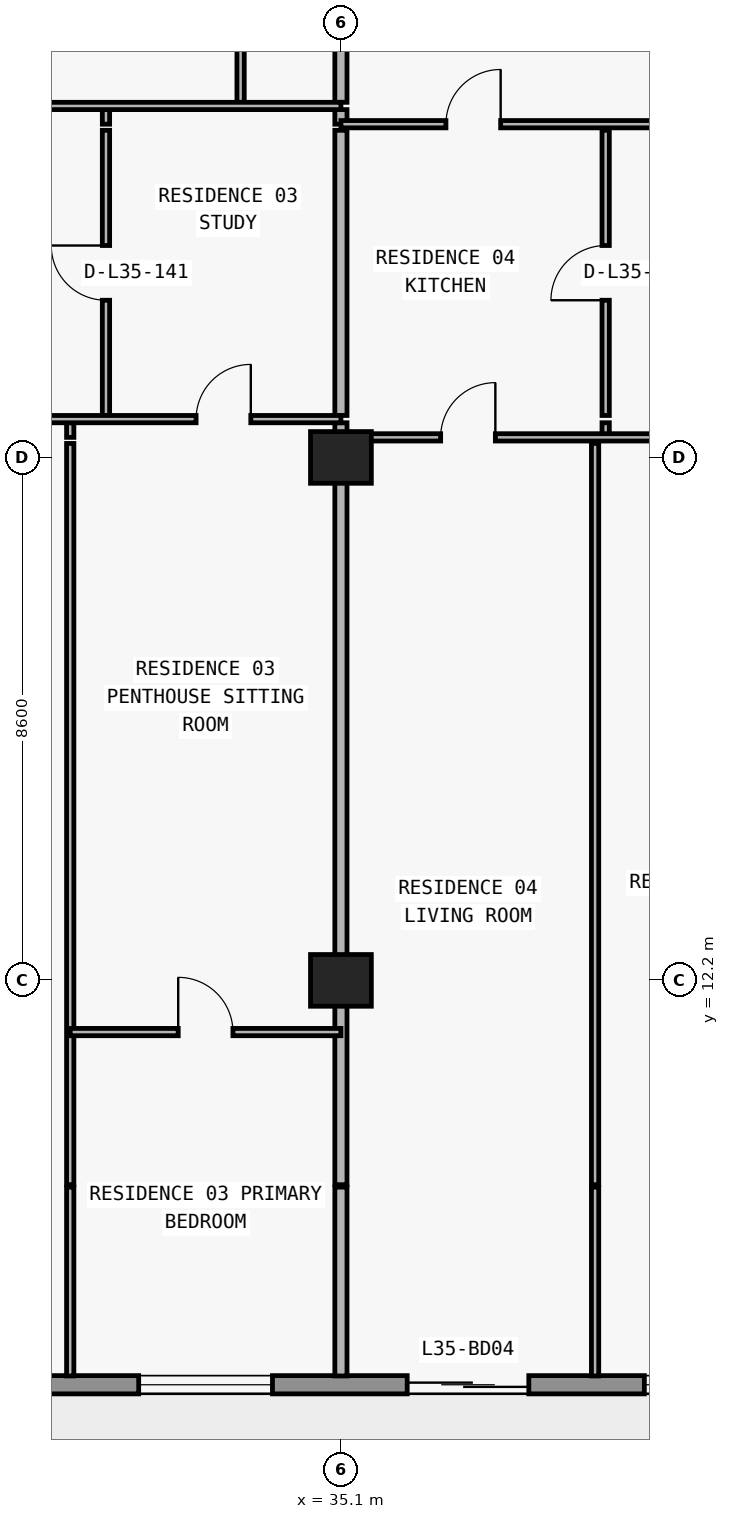
"""IFC4 building model, lengths in metres.
Left out: names, types, materials, properties, quantities, classifications, styles, units other than length and angle.
Written with IfcOpenShell. Run it as: python <this file> out.ifc"""

import sys

from ifc_helpers import new_model, si_unit, direction, frame, frame_2d, origin, origin_2d, place, context, subcontext, project, spatial, rectangle, extrude, element, fill, save


model = new_model("IFC4")
c1 = context("Model", 3, precision=1e-05, world=origin(), true_north=direction((0.0, 1.0)))
c2 = subcontext(c1, "Body", "Model", "MODEL_VIEW")
j1 = project(units=[si_unit("LENGTHUNIT", "METRE"), si_unit("PLANEANGLEUNIT", "RADIAN")], contexts=[c1])
p1 = place(None, origin())
s1 = spatial("IfcSite", under=j1, at=p1, CompositionType="ELEMENT")
p2 = place(p1, origin())
s2 = spatial("IfcBuilding", under=s1, at=p2, CompositionType="ELEMENT")
p3 = place(p2, frame((0.0, 0.0, 129.0)))
s3 = spatial("IfcBuildingStorey", under=s2, at=p3, CompositionType="ELEMENT", Elevation=129.0)
for number, where, z_axis, x_axis in (
    (1, (35.1, 12.2, 0.0), (0.0, 0.0, 1.0), (1.0, 0.0, 0.0)),
    (2, (35.1, 20.8, 0.0), (0.0, 0.0, 1.0), (1.0, 0.0, 0.0)),
):
    element("IfcColumn", number, at=place(p3, frame(where, z_axis=z_axis, x_axis=x_axis)), inside=s3, PredefinedType="COLUMN", context=c2, shape_type="SweptSolid", body=[
        extrude(rectangle(XDim=1.0, YDim=0.85, at=origin_2d()), origin(), (0.0, 0.0, 1.0), 3.05),
    ])
p4 = place(p3, frame((70.1, 5.55, 0.0), z_axis=(0.0, 0.0, 1.0), x_axis=(-1.0, 0.0, 0.0)))
e3 = element("IfcWall", 3, at=p4, inside=s3, PredefinedType="STANDARD", context=c2, shape_type="SweptSolid", body=[
    extrude(rectangle(XDim=62.4, YDim=0.3, at=frame_2d((31.2, 0.0))), origin(), (0.0, 0.0, 1.0), 3.05),
])
p5 = place(p4, frame((57.226, 0.0, 0.0)))
e4 = element("IfcOpeningElement", 4, at=p5, cuts=e3, PredefinedType="OPENING", context=c2, shape_type="SweptSolid", body=[
    extrude(rectangle(XDim=2.0, YDim=2.3, at=frame_2d((1.0, 1.15))), frame((0.0, 0.16, 0.0), z_axis=(0.0, -1.0, 0.0), x_axis=(1.0, 0.0, 0.0)), (0.0, 0.0, 1.0), 0.32),
])
p6 = place(p4, frame((52.926, 0.0, 0.85)))
e5 = element("IfcOpeningElement", 5, at=p6, cuts=e3, PredefinedType="OPENING", context=c2, shape_type="SweptSolid", body=[
    extrude(rectangle(XDim=2.2, YDim=1.55, at=frame_2d((1.1, 0.775))), frame((0.0, 0.16, 0.0), z_axis=(0.0, -1.0, 0.0), x_axis=(1.0, 0.0, 0.0)), (0.0, 0.0, 1.0), 0.32),
])
p7 = place(p4, frame((48.49, 0.0, 0.0)))
e6 = element("IfcOpeningElement", 6, at=p7, cuts=e3, PredefinedType="OPENING", context=c2, shape_type="SweptSolid", body=[
    extrude(rectangle(XDim=2.0, YDim=2.3, at=frame_2d((1.0, 1.15))), frame((0.0, 0.16, 0.0), z_axis=(0.0, -1.0, 0.0), x_axis=(1.0, 0.0, 0.0)), (0.0, 0.0, 1.0), 0.32),
])
p8 = place(p4, frame((44.39, 0.0, 0.85)))
e7 = element("IfcOpeningElement", 7, at=p8, cuts=e3, PredefinedType="OPENING", context=c2, shape_type="SweptSolid", body=[
    extrude(rectangle(XDim=1.8, YDim=1.55, at=frame_2d((0.9, 0.775))), frame((0.0, 0.16, 0.0), z_axis=(0.0, -1.0, 0.0), x_axis=(1.0, 0.0, 0.0)), (0.0, 0.0, 1.0), 0.32),
])
p9 = place(p4, frame((40.426, 0.0, 0.0)))
e8 = element("IfcOpeningElement", 8, at=p9, cuts=e3, PredefinedType="OPENING", context=c2, shape_type="SweptSolid", body=[
    extrude(rectangle(XDim=2.0, YDim=2.3, at=frame_2d((1.0, 1.15))), frame((0.0, 0.16, 0.0), z_axis=(0.0, -1.0, 0.0), x_axis=(1.0, 0.0, 0.0)), (0.0, 0.0, 1.0), 0.32),
])
p10 = place(p4, frame((36.126, 0.0, 0.85)))
e9 = element("IfcOpeningElement", 9, at=p10, cuts=e3, PredefinedType="OPENING", context=c2, shape_type="SweptSolid", body=[
    extrude(rectangle(XDim=2.2, YDim=1.55, at=frame_2d((1.1, 0.775))), frame((0.0, 0.16, 0.0), z_axis=(0.0, -1.0, 0.0), x_axis=(1.0, 0.0, 0.0)), (0.0, 0.0, 1.0), 0.32),
])
p11 = place(p4, frame((31.91, 0.0, 0.0)))
e10 = element("IfcOpeningElement", 10, at=p11, cuts=e3, PredefinedType="OPENING", context=c2, shape_type="SweptSolid", body=[
    extrude(rectangle(XDim=2.0, YDim=2.3, at=frame_2d((1.0, 1.15))), frame((0.0, 0.16, 0.0), z_axis=(0.0, -1.0, 0.0), x_axis=(1.0, 0.0, 0.0)), (0.0, 0.0, 1.0), 0.32),
])
p12 = place(p4, frame((28.21, 0.0, 0.85)))
e11 = element("IfcOpeningElement", 11, at=p12, cuts=e3, PredefinedType="OPENING", context=c2, shape_type="SweptSolid", body=[
    extrude(rectangle(XDim=1.8, YDim=1.55, at=frame_2d((0.9, 0.775))), frame((0.0, 0.16, 0.0), z_axis=(0.0, -1.0, 0.0), x_axis=(1.0, 0.0, 0.0)), (0.0, 0.0, 1.0), 0.32),
])
p13 = place(p4, frame((24.426, 0.0, 0.0)))
e12 = element("IfcOpeningElement", 12, at=p13, cuts=e3, PredefinedType="OPENING", context=c2, shape_type="SweptSolid", body=[
    extrude(rectangle(XDim=2.0, YDim=2.3, at=frame_2d((1.0, 1.15))), frame((0.0, 0.16, 0.0), z_axis=(0.0, -1.0, 0.0), x_axis=(1.0, 0.0, 0.0)), (0.0, 0.0, 1.0), 0.32),
])
p14 = place(p4, frame((20.126, 0.0, 0.85)))
e13 = element("IfcOpeningElement", 13, at=p14, cuts=e3, PredefinedType="OPENING", context=c2, shape_type="SweptSolid", body=[
    extrude(rectangle(XDim=2.2, YDim=1.55, at=frame_2d((1.1, 0.775))), frame((0.0, 0.16, 0.0), z_axis=(0.0, -1.0, 0.0), x_axis=(1.0, 0.0, 0.0)), (0.0, 0.0, 1.0), 0.32),
])
p15 = place(p4, frame((15.69, 0.0, 0.0)))
e14 = element("IfcOpeningElement", 14, at=p15, cuts=e3, PredefinedType="OPENING", context=c2, shape_type="SweptSolid", body=[
    extrude(rectangle(XDim=2.0, YDim=2.3, at=frame_2d((1.0, 1.15))), frame((0.0, 0.16, 0.0), z_axis=(0.0, -1.0, 0.0), x_axis=(1.0, 0.0, 0.0)), (0.0, 0.0, 1.0), 0.32),
])
p16 = place(p4, frame((11.59, 0.0, 0.85)))
e15 = element("IfcOpeningElement", 15, at=p16, cuts=e3, PredefinedType="OPENING", context=c2, shape_type="SweptSolid", body=[
    extrude(rectangle(XDim=1.8, YDim=1.55, at=frame_2d((0.9, 0.775))), frame((0.0, 0.16, 0.0), z_axis=(0.0, -1.0, 0.0), x_axis=(1.0, 0.0, 0.0)), (0.0, 0.0, 1.0), 0.32),
])
p17 = place(p4, frame((7.626, 0.0, 0.0)))
e16 = element("IfcOpeningElement", 16, at=p17, cuts=e3, PredefinedType="OPENING", context=c2, shape_type="SweptSolid", body=[
    extrude(rectangle(XDim=2.0, YDim=2.3, at=frame_2d((1.0, 1.15))), frame((0.0, 0.16, 0.0), z_axis=(0.0, -1.0, 0.0), x_axis=(1.0, 0.0, 0.0)), (0.0, 0.0, 1.0), 0.32),
])
p18 = place(p4, frame((3.326, 0.0, 0.85)))
e17 = element("IfcOpeningElement", 17, at=p18, cuts=e3, PredefinedType="OPENING", context=c2, shape_type="SweptSolid", body=[
    extrude(rectangle(XDim=2.2, YDim=1.55, at=frame_2d((1.1, 0.775))), frame((0.0, 0.16, 0.0), z_axis=(0.0, -1.0, 0.0), x_axis=(1.0, 0.0, 0.0)), (0.0, 0.0, 1.0), 0.32),
])
p19 = place(p3, frame((30.648, 5.695, 0.0), z_axis=(0.0, 0.0, 1.0), x_axis=(0.0, 1.0, 0.0)))
e18 = element("IfcWall", 18, at=p19, inside=s3, PredefinedType="PARTITIONING", context=c2, shape_type="SweptSolid", body=[
    extrude(rectangle(XDim=3.105, YDim=0.12, at=frame_2d((1.552, 0.0))), origin(), (0.0, 0.0, 1.0), 3.05),
])
p20 = place(p3, frame((30.648, 8.84, 0.0), z_axis=(0.0, 0.0, 1.0), x_axis=(0.0, 1.0, 0.0)))
e19 = element("IfcWall", 19, at=p20, inside=s3, PredefinedType="PARTITIONING", context=c2, shape_type="SweptSolid", body=[
    extrude(rectangle(XDim=12.19, YDim=0.12, at=frame_2d((6.095, 0.0))), origin(), (0.0, 0.0, 1.0), 3.05),
])
p21 = place(p3, frame((30.648, 21.13, 0.0), z_axis=(0.0, 0.0, 1.0), x_axis=(0.0, 1.0, 0.0)))
e20 = element("IfcWall", 20, at=p21, inside=s3, PredefinedType="PARTITIONING", context=c2, shape_type="SweptSolid", body=[
    extrude(rectangle(XDim=0.24, YDim=0.12, at=frame_2d((0.12, 0.0))), origin(), (0.0, 0.0, 1.0), 3.05),
])
p22 = place(p3, frame((31.236, 21.49, 0.0), z_axis=(0.0, 0.0, 1.0), x_axis=(0.0, 1.0, 0.0)))
e21 = element("IfcWall", 21, at=p22, inside=s3, PredefinedType="PARTITIONING", context=c2, shape_type="SweptSolid", body=[
    extrude(rectangle(XDim=4.69, YDim=0.12, at=frame_2d((2.345, 0.0))), origin(), (0.0, 0.0, 1.0), 3.05),
])
p23 = place(p22, frame((1.895, 0.0, 0.0)))
e22 = element("IfcOpeningElement", 22, at=p23, cuts=e21, PredefinedType="OPENING", context=c2, shape_type="SweptSolid", body=[
    extrude(rectangle(XDim=0.9, YDim=2.15, at=frame_2d((0.45, 1.075))), frame((0.0, 0.07, 0.0), z_axis=(0.0, -1.0, 0.0), x_axis=(1.0, 0.0, 0.0)), (0.0, 0.0, 1.0), 0.14),
])
p24 = place(p3, frame((31.236, 26.28, 0.0), z_axis=(0.0, 0.0, 1.0), x_axis=(0.0, 1.0, 0.0)))
e23 = element("IfcWall", 23, at=p24, inside=s3, PredefinedType="PARTITIONING", context=c2, shape_type="SweptSolid", body=[
    extrude(rectangle(XDim=0.24, YDim=0.12, at=frame_2d((0.12, 0.0))), origin(), (0.0, 0.0, 1.0), 3.05),
])
p25 = place(p3, frame((33.45, 26.64, 0.0), z_axis=(0.0, 0.0, 1.0), x_axis=(0.0, 1.0, 0.0)))
e24 = element("IfcWall", 24, at=p25, inside=s3, PredefinedType="PARTITIONING", context=c2, shape_type="SweptSolid", body=[
    extrude(rectangle(XDim=8.06, YDim=0.12, at=frame_2d((4.03, 0.0))), origin(), (0.0, 0.0, 1.0), 3.05),
])
p26 = place(p25, frame((3.755, 0.0, 0.0)))
e25 = element("IfcOpeningElement", 25, at=p26, cuts=e24, PredefinedType="OPENING", context=c2, shape_type="SweptSolid", body=[
    extrude(rectangle(XDim=0.85, YDim=2.1, at=frame_2d((0.425, 1.05))), frame((0.0, 0.07, 0.0), z_axis=(0.0, -1.0, 0.0), x_axis=(1.0, 0.0, 0.0)), (0.0, 0.0, 1.0), 0.14),
])
p27 = place(p3, frame((35.1, 5.695, 0.0), z_axis=(0.0, 0.0, 1.0), x_axis=(0.0, 1.0, 0.0)))
e26 = element("IfcWall", 26, at=p27, inside=s3, PredefinedType="PARTITIONING", context=c2, shape_type="SweptSolid", body=[
    extrude(rectangle(XDim=3.105, YDim=0.2, at=frame_2d((1.552, 0.0))), origin(), (0.0, 0.0, 1.0), 3.05),
])
p28 = place(p3, frame((35.1, 8.84, 0.0), z_axis=(0.0, 0.0, 1.0), x_axis=(0.0, 1.0, 0.0)))
e27 = element("IfcWall", 27, at=p28, inside=s3, PredefinedType="PARTITIONING", context=c2, shape_type="SweptSolid", body=[
    extrude(rectangle(XDim=12.19, YDim=0.2, at=frame_2d((6.095, 0.0))), origin(), (0.0, 0.0, 1.0), 2.174),
])
p29 = place(p3, frame((35.1, 21.13, 0.0), z_axis=(0.0, 0.0, 1.0), x_axis=(0.0, 1.0, 0.0)))
e28 = element("IfcWall", 28, at=p29, inside=s3, PredefinedType="PARTITIONING", context=c2, shape_type="SweptSolid", body=[
    extrude(rectangle(XDim=0.24, YDim=0.2, at=frame_2d((0.12, 0.0))), origin(), (0.0, 0.0, 1.0), 2.174),
])
p30 = place(p3, frame((35.1, 21.49, 0.0), z_axis=(0.0, 0.0, 1.0), x_axis=(0.0, 1.0, 0.0)))
e29 = element("IfcWall", 29, at=p30, inside=s3, PredefinedType="PARTITIONING", context=c2, shape_type="SweptSolid", body=[
    extrude(rectangle(XDim=4.69, YDim=0.2, at=frame_2d((2.345, 0.0))), origin(), (0.0, 0.0, 1.0), 2.174),
])
p31 = place(p3, frame((35.1, 26.28, 0.0), z_axis=(0.0, 0.0, 1.0), x_axis=(0.0, 1.0, 0.0)))
e30 = element("IfcWall", 30, at=p31, inside=s3, PredefinedType="PARTITIONING", context=c2, shape_type="SweptSolid", body=[
    extrude(rectangle(XDim=0.24, YDim=0.2, at=frame_2d((0.12, 0.0))), origin(), (0.0, 0.0, 1.0), 2.174),
])
p32 = place(p3, frame((35.1, 26.64, 0.0), z_axis=(0.0, 0.0, 1.0), x_axis=(0.0, 1.0, 0.0)))
e31 = element("IfcWall", 31, at=p32, inside=s3, PredefinedType="PARTITIONING", context=c2, shape_type="SweptSolid", body=[
    extrude(rectangle(XDim=8.06, YDim=0.2, at=frame_2d((4.03, 0.0))), origin(), (0.0, 0.0, 1.0), 2.174),
])
p33 = place(p3, frame((39.28, 5.695, 0.0), z_axis=(0.0, 0.0, 1.0), x_axis=(0.0, 1.0, 0.0)))
e32 = element("IfcWall", 32, at=p33, inside=s3, PredefinedType="PARTITIONING", context=c2, shape_type="SweptSolid", body=[
    extrude(rectangle(XDim=3.105, YDim=0.12, at=frame_2d((1.552, 0.0))), origin(), (0.0, 0.0, 1.0), 3.05),
])
p34 = place(p3, frame((39.28, 8.84, 0.0), z_axis=(0.0, 0.0, 1.0), x_axis=(0.0, 1.0, 0.0)))
e33 = element("IfcWall", 33, at=p34, inside=s3, PredefinedType="PARTITIONING", context=c2, shape_type="SweptSolid", body=[
    extrude(rectangle(XDim=12.19, YDim=0.12, at=frame_2d((6.095, 0.0))), origin(), (0.0, 0.0, 1.0), 3.05),
])
p35 = place(p3, frame((39.454, 21.13, 0.0), z_axis=(0.0, 0.0, 1.0), x_axis=(0.0, 1.0, 0.0)))
e34 = element("IfcWall", 34, at=p35, inside=s3, PredefinedType="PARTITIONING", context=c2, shape_type="SweptSolid", body=[
    extrude(rectangle(XDim=0.24, YDim=0.12, at=frame_2d((0.12, 0.0))), origin(), (0.0, 0.0, 1.0), 3.05),
])
p36 = place(p3, frame((39.454, 21.49, 0.0), z_axis=(0.0, 0.0, 1.0), x_axis=(0.0, 1.0, 0.0)))
e35 = element("IfcWall", 35, at=p36, inside=s3, PredefinedType="PARTITIONING", context=c2, shape_type="SweptSolid", body=[
    extrude(rectangle(XDim=4.69, YDim=0.12, at=frame_2d((2.345, 0.0))), origin(), (0.0, 0.0, 1.0), 3.05),
])
p37 = place(p36, frame((1.895, 0.0, 0.0)))
e36 = element("IfcOpeningElement", 36, at=p37, cuts=e35, PredefinedType="OPENING", context=c2, shape_type="SweptSolid", body=[
    extrude(rectangle(XDim=0.9, YDim=2.15, at=frame_2d((0.45, 1.075))), frame((0.0, 0.07, 0.0), z_axis=(0.0, -1.0, 0.0), x_axis=(1.0, 0.0, 0.0)), (0.0, 0.0, 1.0), 0.14),
])
p38 = place(p3, frame((30.648, 11.35, 0.0), z_axis=(0.0, 0.0, 1.0), x_axis=(1.0, 0.0, 0.0)))
e37 = element("IfcWall", 37, at=p38, inside=s3, PredefinedType="PARTITIONING", context=c2, shape_type="SweptSolid", body=[
    extrude(rectangle(XDim=4.452, YDim=0.12, at=frame_2d((2.226, 0.0))), origin(), (0.0, 0.0, 1.0), 3.05),
])
p39 = place(p38, frame((1.776, 0.0, 0.0)))
e38 = element("IfcOpeningElement", 38, at=p39, cuts=e37, PredefinedType="OPENING", context=c2, shape_type="SweptSolid", body=[
    extrude(rectangle(XDim=0.9, YDim=2.15, at=frame_2d((0.45, 1.075))), frame((0.0, 0.07, 0.0), z_axis=(0.0, -1.0, 0.0), x_axis=(1.0, 0.0, 0.0)), (0.0, 0.0, 1.0), 0.14),
])
p40 = place(p3, frame((35.1, 21.13, 0.0), z_axis=(0.0, 0.0, 1.0), x_axis=(1.0, 0.0, 0.0)))
e39 = element("IfcWall", 39, at=p40, inside=s3, PredefinedType="PARTITIONING", context=c2, shape_type="SweptSolid", body=[
    extrude(rectangle(XDim=7.6, YDim=0.12, at=frame_2d((3.8, 0.0))), origin(), (0.0, 0.0, 1.0), 2.174),
])
p41 = place(p40, frame((1.64, 0.0, 0.0)))
e40 = element("IfcOpeningElement", 40, at=p41, cuts=e39, PredefinedType="OPENING", context=c2, shape_type="SweptSolid", body=[
    extrude(rectangle(XDim=0.9, YDim=2.124, at=frame_2d((0.45, 1.062))), frame((0.0, 0.07, 0.0), z_axis=(0.0, -1.0, 0.0), x_axis=(1.0, 0.0, 0.0)), (0.0, 0.0, 1.0), 0.14),
])
p42 = place(p40, frame((5.527, 0.0, 0.0)))
e41 = element("IfcOpeningElement", 41, at=p42, cuts=e39, PredefinedType="OPENING", context=c2, shape_type="SweptSolid", body=[
    extrude(rectangle(XDim=0.9, YDim=2.124, at=frame_2d((0.45, 1.062))), frame((0.0, 0.07, 0.0), z_axis=(0.0, -1.0, 0.0), x_axis=(1.0, 0.0, 0.0)), (0.0, 0.0, 1.0), 0.14),
])
p43 = place(p3, frame((26.92, 21.43, 0.0), z_axis=(0.0, 0.0, 1.0), x_axis=(1.0, 0.0, 0.0)))
e42 = element("IfcWall", 42, at=p43, inside=s3, PredefinedType="PARTITIONING", context=c2, shape_type="SweptSolid", body=[
    extrude(rectangle(XDim=8.18, YDim=0.12, at=frame_2d((4.09, 0.0))), origin(), (0.0, 0.0, 1.0), 3.05),
])
p44 = place(p43, frame((1.414, 0.0, 0.0)))
e43 = element("IfcOpeningElement", 43, at=p44, cuts=e42, PredefinedType="OPENING", context=c2, shape_type="SweptSolid", body=[
    extrude(rectangle(XDim=0.9, YDim=2.15, at=frame_2d((0.45, 1.075))), frame((0.0, 0.07, 0.0), z_axis=(0.0, -1.0, 0.0), x_axis=(1.0, 0.0, 0.0)), (0.0, 0.0, 1.0), 0.14),
])
p45 = place(p43, frame((5.798, 0.0, 0.0)))
e44 = element("IfcOpeningElement", 44, at=p45, cuts=e42, PredefinedType="OPENING", context=c2, shape_type="SweptSolid", body=[
    extrude(rectangle(XDim=0.9, YDim=2.15, at=frame_2d((0.45, 1.075))), frame((0.0, 0.07, 0.0), z_axis=(0.0, -1.0, 0.0), x_axis=(1.0, 0.0, 0.0)), (0.0, 0.0, 1.0), 0.14),
])
p46 = place(p3, frame((35.1, 26.28, 0.0), z_axis=(0.0, 0.0, 1.0), x_axis=(1.0, 0.0, 0.0)))
e45 = element("IfcWall", 45, at=p46, inside=s3, PredefinedType="PARTITIONING", context=c2, shape_type="SweptSolid", body=[
    extrude(rectangle(XDim=7.6, YDim=0.12, at=frame_2d((3.8, 0.0))), origin(), (0.0, 0.0, 1.0), 3.05),
])
p47 = place(p46, frame((1.727, 0.0, 0.0)))
e46 = element("IfcOpeningElement", 46, at=p47, cuts=e45, PredefinedType="OPENING", context=c2, shape_type="SweptSolid", body=[
    extrude(rectangle(XDim=0.9, YDim=2.15, at=frame_2d((0.45, 1.075))), frame((0.0, 0.07, 0.0), z_axis=(0.0, -1.0, 0.0), x_axis=(1.0, 0.0, 0.0)), (0.0, 0.0, 1.0), 0.14),
])
p48 = place(p3, frame((26.92, 26.58, 0.0), z_axis=(0.0, 0.0, 1.0), x_axis=(1.0, 0.0, 0.0)))
e47 = element("IfcWall", 47, at=p48, inside=s3, PredefinedType="PARTITIONING", context=c2, shape_type="SweptSolid", body=[
    extrude(rectangle(XDim=8.18, YDim=0.12, at=frame_2d((4.09, 0.0))), origin(), (0.0, 0.0, 1.0), 3.05),
])
p49 = place(p48, frame((1.708, 0.0, 0.0)))
e48 = element("IfcOpeningElement", 48, at=p49, cuts=e47, PredefinedType="OPENING", context=c2, shape_type="SweptSolid", body=[
    extrude(rectangle(XDim=0.9, YDim=2.15, at=frame_2d((0.45, 1.075))), frame((0.0, 0.07, 0.0), z_axis=(0.0, -1.0, 0.0), x_axis=(1.0, 0.0, 0.0)), (0.0, 0.0, 1.0), 0.14),
])
p50 = place(p10, origin())
e49 = element("IfcWindow", 49, at=p50, inside=s3, PartitioningType="SINGLE_PANEL", PredefinedType="WINDOW", context=c2, shape_type="SweptSolid", body=[
    extrude(rectangle(XDim=2.2, YDim=1.55, at=frame_2d((1.1, 0.775))), frame((0.0, 0.03, 0.0), z_axis=(0.0, -1.0, 0.0), x_axis=(1.0, 0.0, 0.0)), (0.0, 0.0, 1.0), 0.06),
])
fill(e9, e49)
p51 = place(p11, origin())
e50 = element("IfcDoor", 50, at=p51, inside=s3, OperationType="DOUBLE_DOOR_SLIDING", PredefinedType="DOOR", context=c2, shape_type="SweptSolid", body=[
    extrude(rectangle(XDim=2.0, YDim=2.3, at=frame_2d((1.0, 1.15))), frame((0.0, 0.025, 0.0), z_axis=(0.0, -1.0, 0.0), x_axis=(1.0, 0.0, 0.0)), (0.0, 0.0, 1.0), 0.05),
])
fill(e10, e50)
p52 = place(p12, origin())
e51 = element("IfcWindow", 51, at=p52, inside=s3, PartitioningType="SINGLE_PANEL", PredefinedType="WINDOW", context=c2, shape_type="SweptSolid", body=[
    extrude(rectangle(XDim=1.8, YDim=1.55, at=frame_2d((0.9, 0.775))), frame((0.0, 0.03, 0.0), z_axis=(0.0, -1.0, 0.0), x_axis=(1.0, 0.0, 0.0)), (0.0, 0.0, 1.0), 0.06),
])
fill(e11, e51)
p53 = place(p23, origin())
e52 = element("IfcDoor", 52, at=p53, inside=s3, OperationType="SINGLE_SWING_RIGHT", PredefinedType="DOOR", context=c2, shape_type="SweptSolid", body=[
    extrude(rectangle(XDim=0.9, YDim=2.15, at=frame_2d((0.45, 1.075))), frame((0.0, 0.025, 0.0), z_axis=(0.0, -1.0, 0.0), x_axis=(1.0, 0.0, 0.0)), (0.0, 0.0, 1.0), 0.05),
])
fill(e22, e52)
p54 = place(p45, origin())
e53 = element("IfcDoor", 53, at=p54, inside=s3, OperationType="SINGLE_SWING_RIGHT", PredefinedType="DOOR", context=c2, shape_type="SweptSolid", body=[
    extrude(rectangle(XDim=0.9, YDim=2.15, at=frame_2d((0.45, 1.075))), frame((0.0, 0.025, 0.0), z_axis=(0.0, -1.0, 0.0), x_axis=(1.0, 0.0, 0.0)), (0.0, 0.0, 1.0), 0.05),
])
fill(e44, e53)
p55 = place(p39, origin())
e54 = element("IfcDoor", 54, at=p55, inside=s3, OperationType="SINGLE_SWING_LEFT", PredefinedType="DOOR", context=c2, shape_type="SweptSolid", body=[
    extrude(rectangle(XDim=0.9, YDim=2.15, at=frame_2d((0.45, 1.075))), frame((0.0, 0.025, 0.0), z_axis=(0.0, -1.0, 0.0), x_axis=(1.0, 0.0, 0.0)), (0.0, 0.0, 1.0), 0.05),
])
fill(e38, e54)
p56 = place(p47, origin())
e55 = element("IfcDoor", 55, at=p56, inside=s3, OperationType="SINGLE_SWING_RIGHT", PredefinedType="DOOR", context=c2, shape_type="SweptSolid", body=[
    extrude(rectangle(XDim=0.9, YDim=2.15, at=frame_2d((0.45, 1.075))), frame((0.0, 0.025, 0.0), z_axis=(0.0, -1.0, 0.0), x_axis=(1.0, 0.0, 0.0)), (0.0, 0.0, 1.0), 0.05),
])
fill(e46, e55)
p57 = place(p37, origin())
e56 = element("IfcDoor", 56, at=p57, inside=s3, OperationType="SINGLE_SWING_LEFT", PredefinedType="DOOR", context=c2, shape_type="SweptSolid", body=[
    extrude(rectangle(XDim=0.9, YDim=2.15, at=frame_2d((0.45, 1.075))), frame((0.0, 0.025, 0.0), z_axis=(0.0, -1.0, 0.0), x_axis=(1.0, 0.0, 0.0)), (0.0, 0.0, 1.0), 0.05),
])
fill(e36, e56)
p58 = place(p41, origin())
e57 = element("IfcDoor", 57, at=p58, inside=s3, OperationType="SINGLE_SWING_RIGHT", PredefinedType="DOOR", context=c2, shape_type="SweptSolid", body=[
    extrude(rectangle(XDim=0.9, YDim=2.124, at=frame_2d((0.45, 1.062))), frame((0.0, 0.025, 0.0), z_axis=(0.0, -1.0, 0.0), x_axis=(1.0, 0.0, 0.0)), (0.0, 0.0, 1.0), 0.05),
])
fill(e40, e57)
save(model, sys.argv[1])
